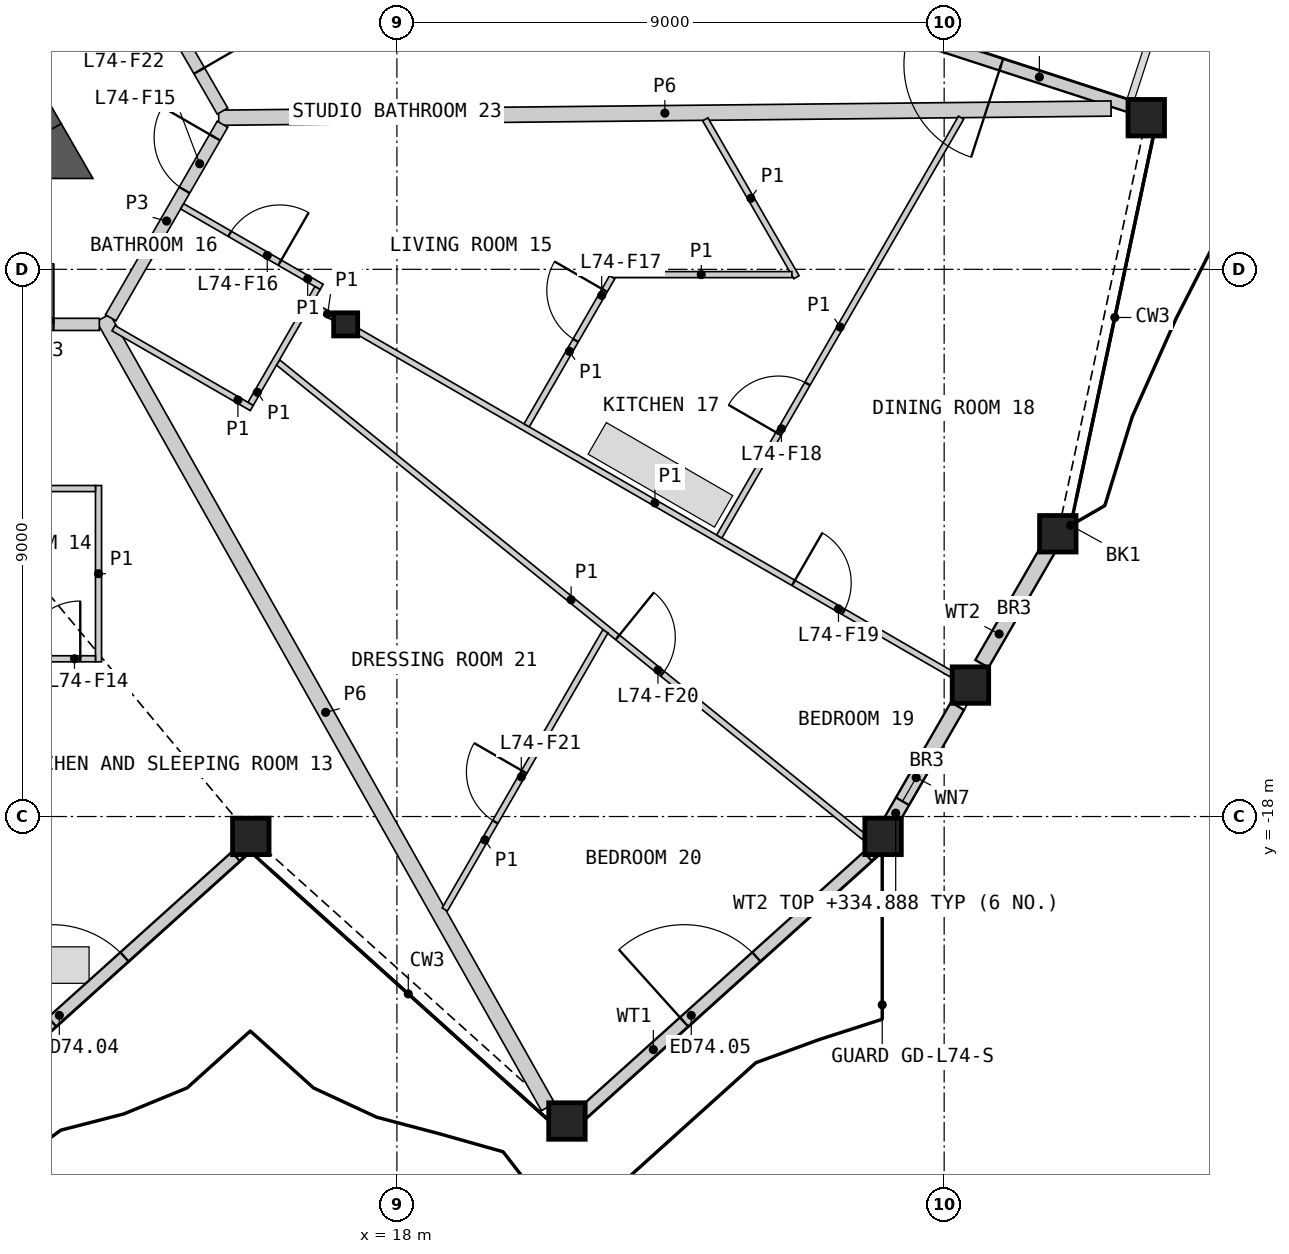
"""IFC4 building model, lengths in metres.
Left out: names, types, materials, properties, quantities, classifications, styles, units other than length and angle.
Written with IfcOpenShell. Run it as: python <this file> out.ifc"""

import sys

from ifc_helpers import new_model, si_unit, direction, frame, frame_2d, origin, origin_2d, place, context, subcontext, project, spatial, polyline, rectangle, hollow_rectangle, i_section, outline, extrude, element, fill, save


model = new_model("IFC4")
c1 = context("Model", 3, precision=1e-05, world=origin(), true_north=direction((0.0, 1.0)))
c2 = subcontext(c1, "Body", "Model", "MODEL_VIEW")
j1 = project(units=[si_unit("LENGTHUNIT", "METRE"), si_unit("PLANEANGLEUNIT", "RADIAN")], contexts=[c1])
p1 = place(None, origin())
s1 = spatial("IfcSite", under=j1, at=p1, CompositionType="ELEMENT")
p2 = place(p1, origin())
s2 = spatial("IfcBuilding", under=s1, at=p2, CompositionType="ELEMENT")
p3 = place(p2, frame((0.0, 0.0, 332.4)))
s3 = spatial("IfcBuildingStorey", under=s2, at=p3, CompositionType="ELEMENT", Elevation=332.4)
for number, where, z_axis, x_axis in (
    (1, (15.597, -18.327, 0.0), (0.0, 0.0, 1.0), (1.0, 0.0, 0.0)),
    (2, (20.796, -23.008, 0.0), (0.0, 0.0, 1.0), (1.0, 0.0, 0.0)),
    (3, (25.995, -18.327, 0.0), (0.0, 0.0, 1.0), (1.0, 0.0, 0.0)),
    (4, (27.432, -15.838, 0.0), (0.0, 0.0, 1.0), (1.0, 0.0, 0.0)),
    (5, (28.869, -13.349, 0.0), (0.0, 0.0, 1.0), (1.0, 0.0, 0.0)),
    (6, (30.324, -6.506, 0.0), (0.0, 0.0, 1.0), (1.0, 0.0, 0.0)),
):
    element("IfcColumn", number, at=place(p3, frame(where, z_axis=z_axis, x_axis=x_axis)), inside=s3, PredefinedType="COLUMN", context=c2, shape_type="SweptSolid", body=[
        extrude(hollow_rectangle(XDim=0.6, YDim=0.6, WallThickness=0.04, at=origin_2d()), origin(), (0.0, 0.0, 1.0), 3.4),
    ])
p4 = place(p3, frame((17.157, -9.906, 0.0), z_axis=(0.0, 0.0, 1.0), x_axis=(1.0, 0.0, 0.0)))
e7 = element("IfcColumn", 7, at=p4, inside=s3, PredefinedType="COLUMN", context=c2, shape_type="SweptSolid", body=[
    extrude(i_section(OverallWidth=0.396, OverallDepth=0.381, WebThickness=0.019, FlangeThickness=0.03, at=origin_2d()), origin(), (0.0, 0.0, 1.0), 3.4),
])
p5 = place(p3, frame((10.648, -22.892, 0.0), z_axis=(0.0, 0.0, 1.0), x_axis=(0.743136819733, 0.669139497532, 0.0)))
e8 = element("IfcWall", 8, at=p5, inside=s3, PredefinedType="SOLIDWALL", context=c2, shape_type="SweptSolid", body=[
    extrude(rectangle(XDim=6.328, YDim=0.2, at=frame_2d((3.164, 0.0))), origin(), (0.0, 0.0, 1.0), 2.488),
])
p6 = place(p5, frame((2.262, 0.0, 0.0)))
e9 = element("IfcOpeningElement", 9, at=p6, cuts=e8, PredefinedType="OPENING", context=c2, shape_type="SweptSolid", body=[
    extrude(rectangle(XDim=1.6, YDim=2.25, at=frame_2d((0.8, 1.125))), frame((0.0, 0.11, 0.0), z_axis=(0.0, -1.0, 0.0), x_axis=(1.0, 0.0, 0.0)), (0.0, 0.0, 1.0), 0.22),
])
p7 = place(p3, frame((21.041, -22.892, 0.0), z_axis=(0.0, 0.0, 1.0), x_axis=(0.743129180176, 0.669147981818, 0.0)))
e10 = element("IfcWall", 10, at=p7, inside=s3, PredefinedType="SOLIDWALL", context=c2, shape_type="SweptSolid", body=[
    extrude(rectangle(XDim=6.33, YDim=0.2, at=frame_2d((3.165, 0.0))), origin(), (0.0, 0.0, 1.0), 2.488),
])
p8 = place(p7, frame((2.262, 0.0, 0.0)))
e11 = element("IfcOpeningElement", 11, at=p8, cuts=e10, PredefinedType="OPENING", context=c2, shape_type="SweptSolid", body=[
    extrude(rectangle(XDim=1.6, YDim=2.25, at=frame_2d((0.8, 1.125))), frame((0.0, 0.11, 0.0), z_axis=(0.0, -1.0, 0.0), x_axis=(1.0, 0.0, 0.0)), (0.0, 0.0, 1.0), 0.22),
])
p9 = place(p3, frame((26.09, -18.139, 0.0), z_axis=(0.0, 0.0, 1.0), x_axis=(0.500046963369, 0.865998287773, 0.0)))
e12 = element("IfcWall", 12, at=p9, inside=s3, PredefinedType="SOLIDWALL", context=c2, shape_type="SweptSolid", body=[
    extrude(rectangle(XDim=2.258, YDim=0.25, at=frame_2d((1.129, 0.0))), origin(), (0.0, 0.0, 1.0), 2.488),
])
p10 = place(p9, frame((0.45, 0.0, 1.6)))
e13 = element("IfcOpeningElement", 13, at=p10, cuts=e12, PredefinedType="OPENING", context=c2, shape_type="SweptSolid", body=[
    extrude(rectangle(XDim=0.9, YDim=0.6, at=frame_2d((0.45, 0.3))), frame((0.0, 0.135, 0.0), z_axis=(0.0, -1.0, 0.0), x_axis=(1.0, 0.0, 0.0)), (0.0, 0.0, 1.0), 0.27),
])
p11 = place(p3, frame((27.621, -15.488, 0.0), z_axis=(0.0, 0.0, 1.0), x_axis=(0.49996174997, 0.866047486323, 0.0)))
e14 = element("IfcWall", 14, at=p11, inside=s3, PredefinedType="SOLIDWALL", context=c2, shape_type="SweptSolid", body=[
    extrude(rectangle(XDim=2.267, YDim=0.25, at=frame_2d((1.133, 0.0))), origin(), (0.0, 0.0, 1.0), 2.488),
])
p12 = place(p3, frame((30.09, -6.333, 0.0), z_axis=(0.0, 0.0, 1.0), x_axis=(-0.951048625867, 0.309041277561, 0.0)))
e15 = element("IfcWall", 15, at=p12, inside=s3, PredefinedType="SOLIDWALL", context=c2, shape_type="SweptSolid", body=[
    extrude(rectangle(XDim=6.408, YDim=0.2, at=frame_2d((3.204, 0.0))), origin(), (0.0, 0.0, 1.0), 2.488),
])
p13 = place(p12, frame((2.262, 0.0, 0.0)))
e16 = element("IfcOpeningElement", 16, at=p13, cuts=e15, PredefinedType="OPENING", context=c2, shape_type="SweptSolid", body=[
    extrude(rectangle(XDim=1.6, YDim=2.25, at=frame_2d((0.8, 1.125))), frame((0.0, 0.11, 0.0), z_axis=(0.0, -1.0, 0.0), x_axis=(1.0, 0.0, 0.0)), (0.0, 0.0, 1.0), 0.22),
])
p14 = place(p3, frame((12.221, -6.756, 0.0), z_axis=(0.0, 0.0, 1.0), x_axis=(-0.500020646047, 0.866013483456, 0.0)))
e17 = element("IfcWall", 17, at=p14, inside=s3, PredefinedType="SHEAR", context=c2, shape_type="SweptSolid", body=[
    extrude(rectangle(XDim=4.559, YDim=0.6, at=frame_2d((2.28, 0.0))), origin(), (0.0, 0.0, 1.0), 3.1),
])
p15 = place(p3, origin())
e18 = element("IfcWall", 18, at=p15, inside=s3, PredefinedType="SHEAR", context=c2, shape_type="SweptSolid", body=[
    extrude(outline(polyline([(11.961, -7.506), (11.961, -6.906), (12.48, -6.606), (13.0, -7.506), (11.961, -7.506)])), origin(), (0.0, 0.0, 1.0), 3.1),
])
p16 = place(p3, frame((15.069, -6.507, 0.0), z_axis=(0.0, 0.0, 1.0), x_axis=(0.999946985532, 0.010296898856, 0.0)))
e19 = element("IfcWall", 19, at=p16, inside=s3, PredefinedType="PARTITIONING", context=c2, shape_type="SweptSolid", body=[
    extrude(rectangle(XDim=14.677, YDim=0.25, at=frame_2d((7.338, 0.0))), origin(), (0.0, 0.0, 1.0), 2.33),
])
p17 = place(p3, frame((13.169, -9.797, 0.0), z_axis=(0.0, 0.0, 1.0), x_axis=(0.4910591841, -0.871126212274, 0.0)))
e20 = element("IfcWall", 20, at=p17, inside=s3, PredefinedType="PARTITIONING", context=c2, shape_type="SweptSolid", body=[
    extrude(rectangle(XDim=14.9, YDim=0.25, at=frame_2d((7.45, 0.0))), origin(), (0.0, 0.0, 1.0), 2.33),
])
p18 = place(p3, frame((8.786, -9.906, 0.0), z_axis=(0.0, 0.0, 1.0), x_axis=(1.0, 0.0, 0.0)))
e21 = element("IfcWall", 21, at=p18, inside=s3, PredefinedType="PARTITIONING", context=c2, shape_type="SweptSolid", body=[
    extrude(rectangle(XDim=4.32, YDim=0.2, at=frame_2d((2.16, 0.0))), origin(), (0.0, 0.0, 1.0), 3.1),
])
p19 = place(p18, frame((2.566, 0.0, 0.0)))
e22 = element("IfcOpeningElement", 22, at=p19, cuts=e21, PredefinedType="OPENING", context=c2, shape_type="SweptSolid", body=[
    extrude(rectangle(XDim=1.0, YDim=2.1, at=frame_2d((0.5, 1.05))), frame((0.0, 0.11, 0.0), z_axis=(0.0, -1.0, 0.0), x_axis=(1.0, 0.0, 0.0)), (0.0, 0.0, 1.0), 0.22),
])
p20 = place(p3, frame((12.988, -2.684, 0.0), z_axis=(0.0, 0.0, 1.0), x_axis=(0.500003406062, -0.866023437285, 0.0)))
e23 = element("IfcWall", 23, at=p20, inside=s3, PredefinedType="PARTITIONING", context=c2, shape_type="SweptSolid", body=[
    extrude(rectangle(XDim=4.288, YDim=0.2, at=frame_2d((2.144, 0.0))), origin(), (0.0, 0.0, 1.0), 3.1),
])
p21 = place(p20, frame((2.521, 0.0, 0.0)))
e24 = element("IfcOpeningElement", 24, at=p21, cuts=e23, PredefinedType="OPENING", context=c2, shape_type="SweptSolid", body=[
    extrude(rectangle(XDim=1.0, YDim=2.1, at=frame_2d((0.5, 1.05))), frame((0.0, 0.11, 0.0), z_axis=(0.0, -1.0, 0.0), x_axis=(1.0, 0.0, 0.0)), (0.0, 0.0, 1.0), 0.22),
])
p22 = place(p3, frame((13.293, -9.797, 0.0), z_axis=(0.0, 0.0, 1.0), x_axis=(0.499967746641, 0.866044024469, 0.0)))
e25 = element("IfcWall", 25, at=p22, inside=s3, PredefinedType="PARTITIONING", context=c2, shape_type="SweptSolid", body=[
    extrude(rectangle(XDim=3.676, YDim=0.2, at=frame_2d((1.838, 0.0))), origin(), (0.0, 0.0, 1.0), 3.1),
])
p23 = place(p22, frame((2.426, 0.0, 0.0)))
e26 = element("IfcOpeningElement", 26, at=p23, cuts=e25, PredefinedType="OPENING", context=c2, shape_type="SweptSolid", body=[
    extrude(rectangle(XDim=1.0, YDim=2.1, at=frame_2d((0.5, 1.05))), frame((0.0, 0.11, 0.0), z_axis=(0.0, -1.0, 0.0), x_axis=(1.0, 0.0, 0.0)), (0.0, 0.0, 1.0), 0.22),
])
p24 = place(p3, frame((16.044, -10.531, 0.0), z_axis=(0.0, 0.0, 1.0), x_axis=(0.777141742697, -0.629325600749, 0.0)))
e27 = element("IfcWall", 27, at=p24, inside=s3, PredefinedType="PARTITIONING", context=c2, shape_type="SweptSolid", body=[
    extrude(rectangle(XDim=12.406, YDim=0.1, at=frame_2d((6.203, 0.0))), origin(), (0.0, 0.0, 1.0), 2.33),
])
p25 = place(p24, frame((7.185, 0.0, 0.0)))
e28 = element("IfcOpeningElement", 28, at=p25, cuts=e27, PredefinedType="OPENING", context=c2, shape_type="SweptSolid", body=[
    extrude(rectangle(XDim=0.95, YDim=2.1, at=frame_2d((0.475, 1.05))), frame((0.0, 0.06, 0.0), z_axis=(0.0, -1.0, 0.0), x_axis=(1.0, 0.0, 0.0)), (0.0, 0.0, 1.0), 0.12),
])
p26 = place(p3, frame((17.365, -10.025, 0.0), z_axis=(0.0, 0.0, 1.0), x_axis=(0.866021046153, -0.500007547564, 0.0)))
e29 = element("IfcWall", 29, at=p26, inside=s3, PredefinedType="PARTITIONING", context=c2, shape_type="SweptSolid", body=[
    extrude(rectangle(XDim=11.267, YDim=0.1, at=frame_2d((5.634, 0.0))), origin(), (0.0, 0.0, 1.0), 2.33),
])
p27 = place(p26, frame((8.264, 0.0, 0.0)))
e30 = element("IfcOpeningElement", 30, at=p27, cuts=e29, PredefinedType="OPENING", context=c2, shape_type="SweptSolid", body=[
    extrude(rectangle(XDim=0.95, YDim=2.1, at=frame_2d((0.475, 1.05))), frame((0.0, 0.06, 0.0), z_axis=(0.0, -1.0, 0.0), x_axis=(1.0, 0.0, 0.0)), (0.0, 0.0, 1.0), 0.12),
])
p28 = place(p3, frame((23.301, -13.395, 0.0), z_axis=(0.0, 0.0, 1.0), x_axis=(0.500017325895, 0.866015400443, 0.0)))
e31 = element("IfcWall", 31, at=p28, inside=s3, PredefinedType="PARTITIONING", context=c2, shape_type="SweptSolid", body=[
    extrude(rectangle(XDim=7.955, YDim=0.1, at=frame_2d((3.978, 0.0))), origin(), (0.0, 0.0, 1.0), 2.33),
])
p29 = place(p28, frame((1.951, 0.0, 0.0)))
e32 = element("IfcOpeningElement", 32, at=p29, cuts=e31, PredefinedType="OPENING", context=c2, shape_type="SweptSolid", body=[
    extrude(rectangle(XDim=0.95, YDim=2.1, at=frame_2d((0.475, 1.05))), frame((0.0, 0.06, 0.0), z_axis=(0.0, -1.0, 0.0), x_axis=(1.0, 0.0, 0.0)), (0.0, 0.0, 1.0), 0.12),
])
p30 = place(p3, frame((18.787, -19.529, 0.0), z_axis=(0.0, 0.0, 1.0), x_axis=(0.499986503906, 0.866033195618, 0.0)))
e33 = element("IfcWall", 33, at=p30, inside=s3, PredefinedType="PARTITIONING", context=c2, shape_type="SweptSolid", body=[
    extrude(rectangle(XDim=5.282, YDim=0.1, at=frame_2d((2.641, 0.0))), origin(), (0.0, 0.0, 1.0), 2.33),
])
p31 = place(p30, frame((1.662, 0.0, 0.0)))
e34 = element("IfcOpeningElement", 34, at=p31, cuts=e33, PredefinedType="OPENING", context=c2, shape_type="SweptSolid", body=[
    extrude(rectangle(XDim=0.95, YDim=2.1, at=frame_2d((0.475, 1.05))), frame((0.0, 0.06, 0.0), z_axis=(0.0, -1.0, 0.0), x_axis=(1.0, 0.0, 0.0)), (0.0, 0.0, 1.0), 0.12),
])
p32 = place(p3, frame((23.072, -6.533, 0.0), z_axis=(0.0, 0.0, 1.0), x_axis=(0.500009026289, -0.866020192391, 0.0)))
e35 = element("IfcWall", 35, at=p32, inside=s3, PredefinedType="PARTITIONING", context=c2, shape_type="SweptSolid", body=[
    extrude(rectangle(XDim=2.999, YDim=0.1, at=frame_2d((1.5, 0.0))), origin(), (0.0, 0.0, 1.0), 2.33),
])
p33 = place(p3, frame((21.515, -9.087, 0.0), z_axis=(0.0, 0.0, 1.0), x_axis=(1.0, 0.0, 0.0)))
e36 = element("IfcWall", 36, at=p33, inside=s3, PredefinedType="PARTITIONING", context=c2, shape_type="SweptSolid", body=[
    extrude(rectangle(XDim=2.981, YDim=0.1, at=frame_2d((1.49, 0.0))), origin(), (0.0, 0.0, 1.0), 2.33),
])
p34 = place(p3, frame((20.134, -11.566, 0.0), z_axis=(0.0, 0.0, 1.0), x_axis=(0.499947857008, 0.866055506462, 0.0)))
e37 = element("IfcWall", 37, at=p34, inside=s3, PredefinedType="PARTITIONING", context=c2, shape_type="SweptSolid", body=[
    extrude(rectangle(XDim=2.813, YDim=0.1, at=frame_2d((1.406, 0.0))), origin(), (0.0, 0.0, 1.0), 2.33),
])
p35 = place(p34, frame((1.613, 0.0, 0.0)))
e38 = element("IfcOpeningElement", 38, at=p35, cuts=e37, PredefinedType="OPENING", context=c2, shape_type="SweptSolid", body=[
    extrude(rectangle(XDim=0.95, YDim=2.1, at=frame_2d((0.475, 1.05))), frame((0.0, 0.06, 0.0), z_axis=(0.0, -1.0, 0.0), x_axis=(1.0, 0.0, 0.0)), (0.0, 0.0, 1.0), 0.12),
])
p36 = place(p3, frame((13.093, -15.456, 0.0), z_axis=(0.0, 0.0, 1.0), x_axis=(0.0, 1.0, 0.0)))
e39 = element("IfcWall", 39, at=p36, inside=s3, PredefinedType="PARTITIONING", context=c2, shape_type="SweptSolid", body=[
    extrude(rectangle(XDim=2.9, YDim=0.1, at=frame_2d((1.45, 0.0))), origin(), (0.0, 0.0, 1.0), 2.33),
])
p37 = place(p3, frame((10.518, -12.606, 0.0), z_axis=(0.0, 0.0, 1.0), x_axis=(1.0, 0.0, 0.0)))
e40 = element("IfcWall", 40, at=p37, inside=s3, PredefinedType="PARTITIONING", context=c2, shape_type="SweptSolid", body=[
    extrude(rectangle(XDim=2.525, YDim=0.1, at=frame_2d((1.262, 0.0))), origin(), (0.0, 0.0, 1.0), 2.33),
])
p38 = place(p3, frame((10.518, -15.406, 0.0), z_axis=(0.0, 0.0, 1.0), x_axis=(1.0, 0.0, 0.0)))
e41 = element("IfcWall", 41, at=p38, inside=s3, PredefinedType="PARTITIONING", context=c2, shape_type="SweptSolid", body=[
    extrude(rectangle(XDim=2.525, YDim=0.1, at=frame_2d((1.262, 0.0))), origin(), (0.0, 0.0, 1.0), 2.33),
])
p39 = place(p38, frame((1.325, 0.0, 0.0)))
e42 = element("IfcOpeningElement", 42, at=p39, cuts=e41, PredefinedType="OPENING", context=c2, shape_type="SweptSolid", body=[
    extrude(rectangle(XDim=0.95, YDim=2.1, at=frame_2d((0.475, 1.05))), frame((0.0, 0.06, 0.0), z_axis=(0.0, -1.0, 0.0), x_axis=(1.0, 0.0, 0.0)), (0.0, 0.0, 1.0), 0.12),
])
p40 = place(p3, frame((14.468, -7.964, 0.0), z_axis=(0.0, 0.0, 1.0), x_axis=(0.865989200783, -0.500062700197, 0.0)))
e43 = element("IfcWall", 43, at=p40, inside=s3, PredefinedType="PARTITIONING", context=c2, shape_type="SweptSolid", body=[
    extrude(rectangle(XDim=2.65, YDim=0.1, at=frame_2d((1.325, 0.0))), origin(), (0.0, 0.0, 1.0), 2.33),
])
p41 = place(p40, frame((0.905, 0.0, 0.0)))
e44 = element("IfcOpeningElement", 44, at=p41, cuts=e43, PredefinedType="OPENING", context=c2, shape_type="SweptSolid", body=[
    extrude(rectangle(XDim=0.95, YDim=2.1, at=frame_2d((0.475, 1.05))), frame((0.0, 0.06, 0.0), z_axis=(0.0, -1.0, 0.0), x_axis=(1.0, 0.0, 0.0)), (0.0, 0.0, 1.0), 0.12),
])
p42 = place(p3, frame((13.339, -9.968, 0.0), z_axis=(0.0, 0.0, 1.0), x_axis=(0.866036909293, -0.499980071345, 0.0)))
e45 = element("IfcWall", 45, at=p42, inside=s3, PredefinedType="PARTITIONING", context=c2, shape_type="SweptSolid", body=[
    extrude(rectangle(XDim=2.625, YDim=0.1, at=frame_2d((1.312, 0.0))), origin(), (0.0, 0.0, 1.0), 2.33),
])
p43 = place(p3, frame((15.594, -11.212, 0.0), z_axis=(0.0, 0.0, 1.0), x_axis=(0.499898558967, 0.866083962871, 0.0)))
e46 = element("IfcWall", 46, at=p43, inside=s3, PredefinedType="PARTITIONING", context=c2, shape_type="SweptSolid", body=[
    extrude(rectangle(XDim=2.2, YDim=0.1, at=frame_2d((1.1, 0.0))), origin(), (0.0, 0.0, 1.0), 2.33),
])
p44 = place(p3, frame((16.594, -9.581, 0.0), z_axis=(0.0, 0.0, 1.0), x_axis=(0.866036909293, -0.499980071345, 0.0)))
e47 = element("IfcWall", 47, at=p44, inside=s3, PredefinedType="PARTITIONING", context=c2, shape_type="SweptSolid", body=[
    extrude(rectangle(XDim=0.41, YDim=0.1, at=frame_2d((0.205, 0.0))), origin(), (0.0, 0.0, 1.0), 2.33),
])
p45 = place(p6, origin())
e48 = element("IfcDoor", 48, at=p45, inside=s3, OperationType="DOUBLE_DOOR_SINGLE_SWING", PredefinedType="DOOR", context=c2, shape_type="SweptSolid", body=[
    extrude(rectangle(XDim=1.6, YDim=2.25, at=frame_2d((0.8, 1.125))), frame((0.0, 0.025, 0.0), z_axis=(0.0, -1.0, 0.0), x_axis=(1.0, 0.0, 0.0)), (0.0, 0.0, 1.0), 0.05),
])
fill(e9, e48)
p46 = place(p8, origin())
e49 = element("IfcDoor", 49, at=p46, inside=s3, OperationType="DOUBLE_DOOR_SINGLE_SWING", PredefinedType="DOOR", context=c2, shape_type="SweptSolid", body=[
    extrude(rectangle(XDim=1.6, YDim=2.25, at=frame_2d((0.8, 1.125))), frame((0.0, 0.025, 0.0), z_axis=(0.0, -1.0, 0.0), x_axis=(1.0, 0.0, 0.0)), (0.0, 0.0, 1.0), 0.05),
])
fill(e11, e49)
p47 = place(p10, origin())
e50 = element("IfcWindow", 50, at=p47, inside=s3, PartitioningType="SINGLE_PANEL", PredefinedType="WINDOW", context=c2, shape_type="SweptSolid", body=[
    extrude(rectangle(XDim=0.9, YDim=0.6, at=frame_2d((0.45, 0.3))), frame((0.0, 0.03, 0.0), z_axis=(0.0, -1.0, 0.0), x_axis=(1.0, 0.0, 0.0)), (0.0, 0.0, 1.0), 0.06),
])
fill(e13, e50)
p48 = place(p13, origin())
e51 = element("IfcDoor", 51, at=p48, inside=s3, OperationType="DOUBLE_DOOR_SINGLE_SWING", PredefinedType="DOOR", context=c2, shape_type="SweptSolid", body=[
    extrude(rectangle(XDim=1.6, YDim=2.25, at=frame_2d((0.8, 1.125))), frame((0.0, 0.025, 0.0), z_axis=(0.0, -1.0, 0.0), x_axis=(1.0, 0.0, 0.0)), (0.0, 0.0, 1.0), 0.05),
])
fill(e16, e51)
p49 = place(p19, origin())
e52 = element("IfcDoor", 52, at=p49, inside=s3, OperationType="SINGLE_SWING_RIGHT", PredefinedType="DOOR", context=c2, shape_type="SweptSolid", body=[
    extrude(rectangle(XDim=1.0, YDim=2.1, at=frame_2d((0.5, 1.05))), frame((0.0, 0.025, 0.0), z_axis=(0.0, -1.0, 0.0), x_axis=(1.0, 0.0, 0.0)), (0.0, 0.0, 1.0), 0.05),
])
fill(e22, e52)
p50 = place(p39, origin())
e53 = element("IfcDoor", 53, at=p50, inside=s3, OperationType="SINGLE_SWING_RIGHT", PredefinedType="DOOR", context=c2, shape_type="SweptSolid", body=[
    extrude(rectangle(XDim=0.95, YDim=2.1, at=frame_2d((0.475, 1.05))), frame((0.0, 0.025, 0.0), z_axis=(0.0, -1.0, 0.0), x_axis=(1.0, 0.0, 0.0)), (0.0, 0.0, 1.0), 0.05),
])
fill(e42, e53)
p51 = place(p23, origin())
e54 = element("IfcDoor", 54, at=p51, inside=s3, OperationType="SINGLE_SWING_RIGHT", PredefinedType="DOOR", context=c2, shape_type="SweptSolid", body=[
    extrude(rectangle(XDim=1.0, YDim=2.1, at=frame_2d((0.5, 1.05))), frame((0.0, 0.025, 0.0), z_axis=(0.0, -1.0, 0.0), x_axis=(1.0, 0.0, 0.0)), (0.0, 0.0, 1.0), 0.05),
])
fill(e26, e54)
p52 = place(p41, origin())
e55 = element("IfcDoor", 55, at=p52, inside=s3, OperationType="SINGLE_SWING_RIGHT", PredefinedType="DOOR", context=c2, shape_type="SweptSolid", body=[
    extrude(rectangle(XDim=0.95, YDim=2.1, at=frame_2d((0.475, 1.05))), frame((0.0, 0.025, 0.0), z_axis=(0.0, -1.0, 0.0), x_axis=(1.0, 0.0, 0.0)), (0.0, 0.0, 1.0), 0.05),
])
fill(e44, e55)
p53 = place(p35, origin())
e56 = element("IfcDoor", 56, at=p53, inside=s3, OperationType="SINGLE_SWING_RIGHT", PredefinedType="DOOR", context=c2, shape_type="SweptSolid", body=[
    extrude(rectangle(XDim=0.95, YDim=2.1, at=frame_2d((0.475, 1.05))), frame((0.0, 0.025, 0.0), z_axis=(0.0, -1.0, 0.0), x_axis=(1.0, 0.0, 0.0)), (0.0, 0.0, 1.0), 0.05),
])
fill(e38, e56)
p54 = place(p29, origin())
e57 = element("IfcDoor", 57, at=p54, inside=s3, OperationType="SINGLE_SWING_LEFT", PredefinedType="DOOR", context=c2, shape_type="SweptSolid", body=[
    extrude(rectangle(XDim=0.95, YDim=2.1, at=frame_2d((0.475, 1.05))), frame((0.0, 0.025, 0.0), z_axis=(0.0, -1.0, 0.0), x_axis=(1.0, 0.0, 0.0)), (0.0, 0.0, 1.0), 0.05),
])
fill(e32, e57)
p55 = place(p27, origin())
e58 = element("IfcDoor", 58, at=p55, inside=s3, OperationType="SINGLE_SWING_LEFT", PredefinedType="DOOR", context=c2, shape_type="SweptSolid", body=[
    extrude(rectangle(XDim=0.95, YDim=2.1, at=frame_2d((0.475, 1.05))), frame((0.0, 0.025, 0.0), z_axis=(0.0, -1.0, 0.0), x_axis=(1.0, 0.0, 0.0)), (0.0, 0.0, 1.0), 0.05),
])
fill(e30, e58)
p56 = place(p25, origin())
e59 = element("IfcDoor", 59, at=p56, inside=s3, OperationType="SINGLE_SWING_LEFT", PredefinedType="DOOR", context=c2, shape_type="SweptSolid", body=[
    extrude(rectangle(XDim=0.95, YDim=2.1, at=frame_2d((0.475, 1.05))), frame((0.0, 0.025, 0.0), z_axis=(0.0, -1.0, 0.0), x_axis=(1.0, 0.0, 0.0)), (0.0, 0.0, 1.0), 0.05),
])
fill(e28, e59)
p57 = place(p31, origin())
e60 = element("IfcDoor", 60, at=p57, inside=s3, OperationType="SINGLE_SWING_RIGHT", PredefinedType="DOOR", context=c2, shape_type="SweptSolid", body=[
    extrude(rectangle(XDim=0.95, YDim=2.1, at=frame_2d((0.475, 1.05))), frame((0.0, 0.025, 0.0), z_axis=(0.0, -1.0, 0.0), x_axis=(1.0, 0.0, 0.0)), (0.0, 0.0, 1.0), 0.05),
])
fill(e34, e60)
p58 = place(p21, origin())
e61 = element("IfcDoor", 61, at=p58, inside=s3, OperationType="SINGLE_SWING_RIGHT", PredefinedType="DOOR", context=c2, shape_type="SweptSolid", body=[
    extrude(rectangle(XDim=1.0, YDim=2.1, at=frame_2d((0.5, 1.05))), frame((0.0, 0.025, 0.0), z_axis=(0.0, -1.0, 0.0), x_axis=(1.0, 0.0, 0.0)), (0.0, 0.0, 1.0), 0.05),
])
fill(e24, e61)
save(model, sys.argv[1])
